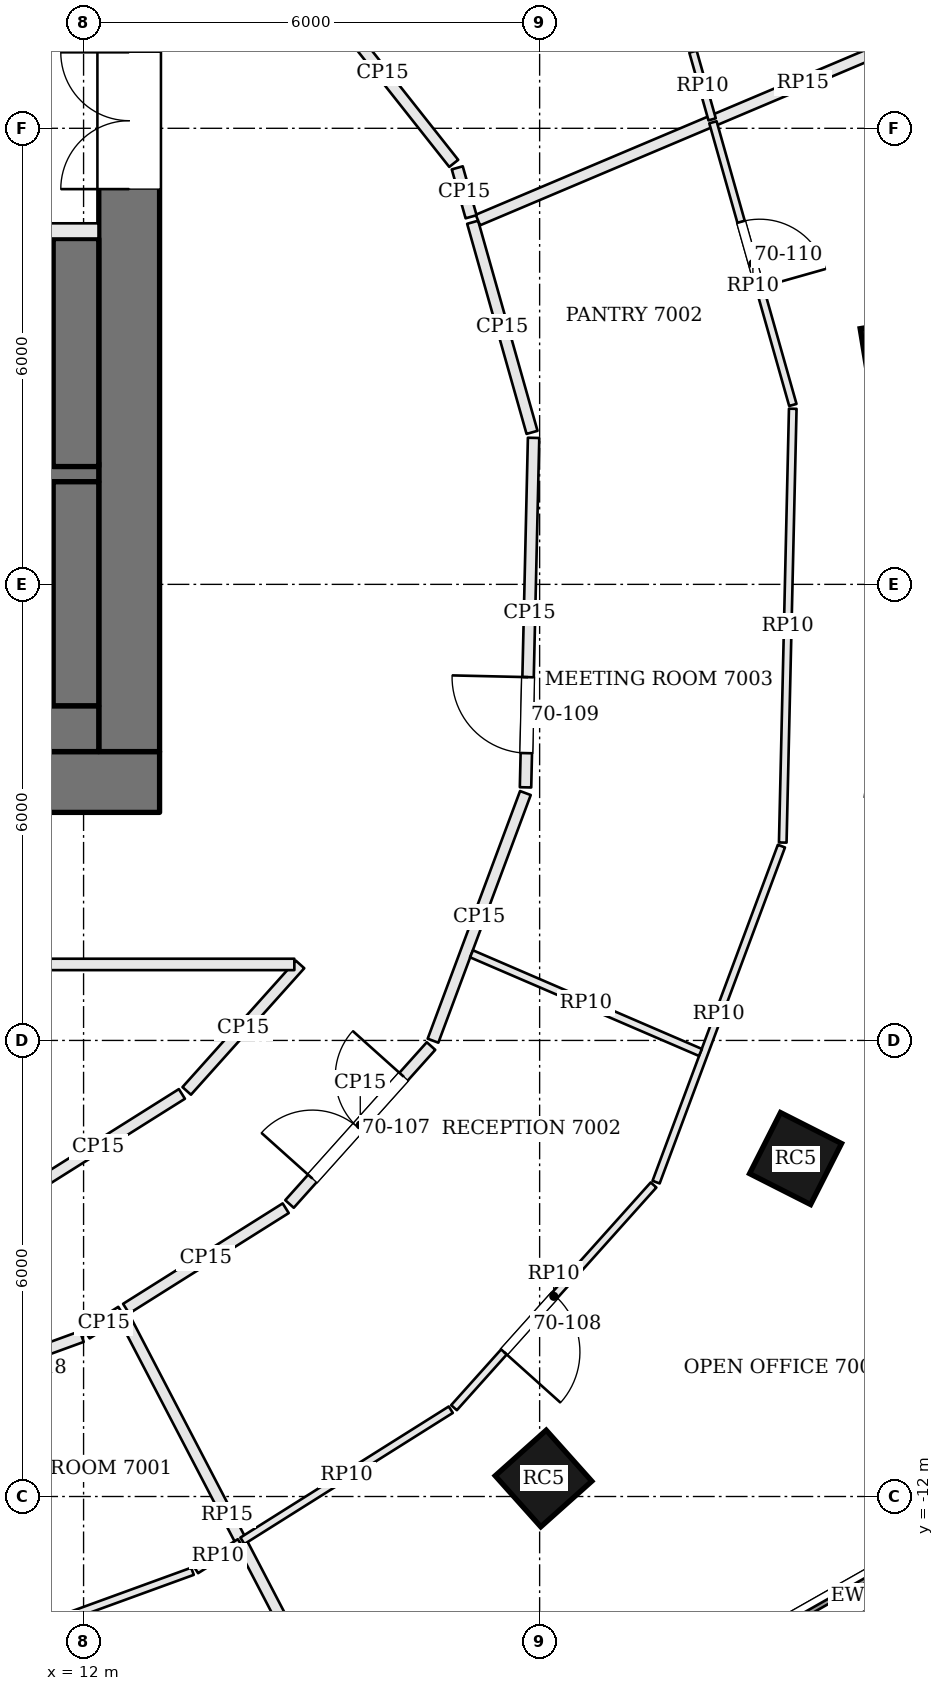
"""IFC4 building model, lengths in metres.
Left out: names, types, materials, properties, quantities, classifications, styles, units other than length and angle.
Written with IfcOpenShell. Run it as: python <this file> out.ifc"""

import sys

from ifc_helpers import new_model, si_unit, direction, frame, frame_2d, origin, origin_2d, place, context, subcontext, project, spatial, rectangle, extrude, element, fill, save


model = new_model("IFC4")
c1 = context("Model", 3, precision=1e-05, world=origin(), true_north=direction((0.0, 1.0)))
c2 = subcontext(c1, "Body", "Model", "MODEL_VIEW")
j1 = project(units=[si_unit("LENGTHUNIT", "METRE"), si_unit("PLANEANGLEUNIT", "RADIAN")], contexts=[c1])
p1 = place(None, origin())
s1 = spatial("IfcSite", under=j1, at=p1, CompositionType="ELEMENT")
p2 = place(p1, origin())
s2 = spatial("IfcBuilding", under=s1, at=p2, CompositionType="ELEMENT")
p3 = place(p2, frame((0.0, 0.0, 284.4)))
s3 = spatial("IfcBuildingStorey", under=s2, at=p3, CompositionType="ELEMENT", Elevation=284.4)
p4 = place(p3, frame((-13.0, -2.6, 0.0), z_axis=(0.0, 0.0, 1.0), x_axis=(1.0, 0.0, 0.0)))
e1 = element("IfcWall", 1, at=p4, inside=s3, PredefinedType="SHEAR", context=c2, shape_type="SweptSolid", body=[
    extrude(rectangle(XDim=26.0, YDim=0.8, at=frame_2d((13.0, 0.0))), origin(), (0.0, 0.0, 1.0), 3.9),
])
p5 = place(p4, frame((9.275, 0.0, 0.0)))
e2 = element("IfcOpeningElement", 2, at=p5, cuts=e1, PredefinedType="OPENING", context=c2, shape_type="SweptSolid", body=[
    extrude(rectangle(XDim=0.9, YDim=2.1, at=frame_2d((0.45, 1.05))), frame((0.0, 0.41, 0.0), z_axis=(0.0, -1.0, 0.0), x_axis=(1.0, 0.0, 0.0)), (0.0, 0.0, 1.0), 0.82),
])
p6 = place(p4, frame((11.75, 0.0, 0.0)))
e3 = element("IfcOpeningElement", 3, at=p6, cuts=e1, PredefinedType="OPENING", context=c2, shape_type="SweptSolid", body=[
    extrude(rectangle(XDim=1.0, YDim=2.1, at=frame_2d((0.5, 1.05))), frame((0.0, 0.41, 0.0), z_axis=(0.0, -1.0, 0.0), x_axis=(1.0, 0.0, 0.0)), (0.0, 0.0, 1.0), 0.82),
])
p7 = place(p4, frame((14.325, 0.0, 0.0)))
e4 = element("IfcOpeningElement", 4, at=p7, cuts=e1, PredefinedType="OPENING", context=c2, shape_type="SweptSolid", body=[
    extrude(rectangle(XDim=0.9, YDim=2.1, at=frame_2d((0.45, 1.05))), frame((0.0, 0.41, 0.0), z_axis=(0.0, -1.0, 0.0), x_axis=(1.0, 0.0, 0.0)), (0.0, 0.0, 1.0), 0.82),
])
p8 = place(p4, frame((16.7, 0.0, 0.0)))
e5 = element("IfcOpeningElement", 5, at=p8, cuts=e1, PredefinedType="OPENING", context=c2, shape_type="SweptSolid", body=[
    extrude(rectangle(XDim=0.9, YDim=2.1, at=frame_2d((0.45, 1.05))), frame((0.0, 0.41, 0.0), z_axis=(0.0, -1.0, 0.0), x_axis=(1.0, 0.0, 0.0)), (0.0, 0.0, 1.0), 0.82),
])
p9 = place(p3, frame((12.6, -2.2, 0.0), z_axis=(0.0, 0.0, 1.0), x_axis=(0.0, 1.0, 0.0)))
e6 = element("IfcWall", 6, at=p9, inside=s3, PredefinedType="SHEAR", context=c2, shape_type="SweptSolid", body=[
    extrude(rectangle(XDim=13.4, YDim=0.8, at=frame_2d((6.7, 0.0))), origin(), (0.0, 0.0, 1.0), 3.9),
])
p10 = place(p9, frame((7.4, 0.0, 0.0)))
e7 = element("IfcOpeningElement", 7, at=p10, cuts=e6, PredefinedType="OPENING", context=c2, shape_type="SweptSolid", body=[
    extrude(rectangle(XDim=1.8, YDim=2.1, at=frame_2d((0.9, 1.05))), frame((0.0, 0.41, 0.0), z_axis=(0.0, -1.0, 0.0), x_axis=(1.0, 0.0, 0.0)), (0.0, 0.0, 1.0), 0.82),
])
for number, where, z_axis, x_axis in (
    (8, (22.734, 2.993, 0.0), (0.0, 0.0, 1.0), (-0.162, 0.987, 0.0)),
    (9, (18.051, -11.763, 0.0), (0.0, 0.0, 1.0), (0.746, 0.666, 0.0)),
    (10, (21.367, -7.554, 0.0), (0.0, 0.0, 1.0), (0.452, 0.892, 0.0)),
):
    element("IfcColumn", number, at=place(p3, frame(where, z_axis=z_axis, x_axis=x_axis)), inside=s3, PredefinedType="COLUMN", context=c2, shape_type="SweptSolid", body=[
        extrude(rectangle(XDim=0.9, YDim=0.9, at=origin_2d()), origin(), (0.0, 0.0, 1.0), 3.9),
    ])
p11 = place(p3, frame((20.115, -14.455, 0.0), z_axis=(0.0, 0.0, 1.0), x_axis=(0.869822679286, 0.493364476427, 0.0)))
e11 = element("IfcWall", 11, at=p11, inside=s3, PredefinedType="SOLIDWALL", context=c2, shape_type="SweptSolid", body=[
    extrude(rectangle(XDim=4.638, YDim=0.45, at=frame_2d((2.319, 0.0))), origin(), (0.0, 0.0, 1.0), 3.7),
])
p12 = place(p11, frame((1.269, 0.0, 0.9)))
e12 = element("IfcOpeningElement", 12, at=p12, cuts=e11, PredefinedType="OPENING", context=c2, shape_type="SweptSolid", body=[
    extrude(rectangle(XDim=2.1, YDim=2.3, at=frame_2d((1.05, 1.15))), frame((0.0, 0.235, 0.0), z_axis=(0.0, -1.0, 0.0), x_axis=(1.0, 0.0, 0.0)), (0.0, 0.0, 1.0), 0.47),
])
p13 = place(p3, frame((12.2, 4.65, 0.0), z_axis=(0.0, 0.0, 1.0), x_axis=(-1.0, 0.0, 0.0)))
e13 = element("IfcWall", 13, at=p13, inside=s3, PredefinedType="SOLIDWALL", context=c2, shape_type="SweptSolid", body=[
    extrude(rectangle(XDim=7.1, YDim=0.2, at=frame_2d((3.55, 0.0))), origin(), (0.0, 0.0, 1.0), 3.7),
])
p14 = place(p13, frame((4.4, 0.0, 0.0)))
e14 = element("IfcOpeningElement", 14, at=p14, cuts=e13, PredefinedType="OPENING", context=c2, shape_type="SweptSolid", body=[
    extrude(rectangle(XDim=1.2, YDim=2.1, at=frame_2d((0.6, 1.05))), frame((0.0, 0.11, 0.0), z_axis=(0.0, -1.0, 0.0), x_axis=(1.0, 0.0, 0.0)), (0.0, 0.0, 1.0), 0.22),
])
p15 = place(p13, frame((1.1, 0.0, 0.0)))
e15 = element("IfcOpeningElement", 15, at=p15, cuts=e13, PredefinedType="OPENING", context=c2, shape_type="SweptSolid", body=[
    extrude(rectangle(XDim=1.2, YDim=2.1, at=frame_2d((0.6, 1.05))), frame((0.0, 0.11, 0.0), z_axis=(0.0, -1.0, 0.0), x_axis=(1.0, 0.0, 0.0)), (0.0, 0.0, 1.0), 0.22),
])
p16 = place(p3, frame((12.2, 1.475, 0.0), z_axis=(0.0, 0.0, 1.0), x_axis=(-1.0, 0.0, 0.0)))
e16 = element("IfcWall", 16, at=p16, inside=s3, PredefinedType="SOLIDWALL", context=c2, shape_type="SweptSolid", body=[
    extrude(rectangle(XDim=7.1, YDim=0.25, at=frame_2d((3.55, 0.0))), origin(), (0.0, 0.0, 1.0), 3.7),
])
p17 = place(p16, frame((5.8, 0.0, 0.0)))
e17 = element("IfcOpeningElement", 17, at=p17, cuts=e16, PredefinedType="OPENING", context=c2, shape_type="SweptSolid", body=[
    extrude(rectangle(XDim=1.2, YDim=2.1, at=frame_2d((0.6, 1.05))), frame((0.0, 0.135, 0.0), z_axis=(0.0, -1.0, 0.0), x_axis=(1.0, 0.0, 0.0)), (0.0, 0.0, 1.0), 0.27),
])
p18 = place(p3, frame((11.9, 4.55, 0.0), z_axis=(0.0, 0.0, 1.0), x_axis=(0.0, -1.0, 0.0)))
e18 = element("IfcWall", 18, at=p18, inside=s3, PredefinedType="SOLIDWALL", context=c2, shape_type="SweptSolid", body=[
    extrude(rectangle(XDim=3.0, YDim=0.6, at=frame_2d((1.5, 0.0))), origin(), (0.0, 0.0, 1.0), 3.7),
])
p19 = place(p3, frame((11.9, 1.35, 0.0), z_axis=(0.0, 0.0, 1.0), x_axis=(0.0, -1.0, 0.0)))
e19 = element("IfcWall", 19, at=p19, inside=s3, PredefinedType="SOLIDWALL", context=c2, shape_type="SweptSolid", body=[
    extrude(rectangle(XDim=2.95, YDim=0.6, at=frame_2d((1.475, 0.0))), origin(), (0.0, 0.0, 1.0), 3.7),
])
p20 = place(p3, frame((12.2, -1.9, 0.0), z_axis=(0.0, 0.0, 1.0), x_axis=(-1.0, 0.0, 0.0)))
e20 = element("IfcWall", 20, at=p20, inside=s3, PredefinedType="SOLIDWALL", context=c2, shape_type="SweptSolid", body=[
    extrude(rectangle(XDim=7.1, YDim=0.6, at=frame_2d((3.55, 0.0))), origin(), (0.0, 0.0, 1.0), 3.7),
])
p21 = place(p3, frame((8.86, -11.03, 0.0), z_axis=(0.0, 0.0, 1.0), x_axis=(0.939685902536, 0.342038601001, 0.0)))
e21 = element("IfcWall", 21, at=p21, inside=s3, PredefinedType="PARTITIONING", context=c2, shape_type="SweptSolid", body=[
    extrude(rectangle(XDim=3.316, YDim=0.15, at=frame_2d((1.658, 0.0))), origin(), (0.0, 0.0, 1.0), 3.198),
])
p22 = place(p21, frame((1.65, 0.0, 0.0)))
e22 = element("IfcOpeningElement", 22, at=p22, cuts=e21, PredefinedType="OPENING", context=c2, shape_type="SweptSolid", body=[
    extrude(rectangle(XDim=0.9, YDim=2.1, at=frame_2d((0.45, 1.05))), frame((0.0, 0.085, 0.0), z_axis=(0.0, -1.0, 0.0), x_axis=(1.0, 0.0, 0.0)), (0.0, 0.0, 1.0), 0.17),
])
p23 = place(p3, frame((12.04, -9.856, 0.0), z_axis=(0.0, 0.0, 1.0), x_axis=(0.846240393033, 0.532801273647, 0.0)))
e23 = element("IfcWall", 23, at=p23, inside=s3, PredefinedType="PARTITIONING", context=c2, shape_type="SweptSolid", body=[
    extrude(rectangle(XDim=0.54, YDim=0.15, at=frame_2d((0.27, 0.0))), origin(), (0.0, 0.0, 1.0), 3.198),
])
p24 = place(p3, frame((15.244, -14.841, 0.0), z_axis=(0.0, 0.0, 1.0), x_axis=(-0.462122511499, 0.886816093881, 0.0)))
e24 = element("IfcWall", 24, at=p24, inside=s3, PredefinedType="PARTITIONING", context=c2, shape_type="SweptSolid", body=[
    extrude(rectangle(XDim=5.871, YDim=0.15, at=frame_2d((2.935, 0.0))), origin(), (0.0, 0.0, 1.0), 3.234),
])
p25 = place(p3, frame((12.56, -9.529, 0.0), z_axis=(0.0, 0.0, 1.0), x_axis=(0.846402081662, 0.53254437952, 0.0)))
e25 = element("IfcWall", 25, at=p25, inside=s3, PredefinedType="PARTITIONING", context=c2, shape_type="SweptSolid", body=[
    extrude(rectangle(XDim=2.481, YDim=0.15, at=frame_2d((1.24, 0.0))), origin(), (0.0, 0.0, 1.0), 3.198),
])
p26 = place(p3, frame((14.709, -8.152, 0.0), z_axis=(0.0, 0.0, 1.0), x_axis=(0.667275630306, 0.744810870758, 0.0)))
e26 = element("IfcWall", 26, at=p26, inside=s3, PredefinedType="PARTITIONING", context=c2, shape_type="SweptSolid", body=[
    extrude(rectangle(XDim=2.79, YDim=0.15, at=frame_2d((1.395, 0.0))), origin(), (0.0, 0.0, 1.0), 3.198),
])
p27 = place(p26, frame((0.45, 0.0, 0.0)))
e27 = element("IfcOpeningElement", 27, at=p27, cuts=e26, PredefinedType="OPENING", context=c2, shape_type="SweptSolid", body=[
    extrude(rectangle(XDim=1.8, YDim=2.1, at=frame_2d((0.9, 1.05))), frame((0.0, 0.085, 0.0), z_axis=(0.0, -1.0, 0.0), x_axis=(1.0, 0.0, 0.0)), (0.0, 0.0, 1.0), 0.17),
])
p28 = place(p3, frame((16.597, -6.003, 0.0), z_axis=(0.0, 0.0, 1.0), x_axis=(0.349499455299, 0.936936567088, 0.0)))
e28 = element("IfcWall", 28, at=p28, inside=s3, PredefinedType="PARTITIONING", context=c2, shape_type="SweptSolid", body=[
    extrude(rectangle(XDim=3.477, YDim=0.15, at=frame_2d((1.739, 0.0))), origin(), (0.0, 0.0, 1.0), 3.198),
])
p29 = place(p3, frame((17.814, -2.67, 0.0), z_axis=(0.0, 0.0, 1.0), x_axis=(0.023038539091, 0.999734577634, 0.0)))
e29 = element("IfcWall", 29, at=p29, inside=s3, PredefinedType="PARTITIONING", context=c2, shape_type="SweptSolid", body=[
    extrude(rectangle(XDim=4.599, YDim=0.15, at=frame_2d((2.3, 0.0))), origin(), (0.0, 0.0, 1.0), 3.198),
])
p30 = place(p29, frame((0.45, 0.0, 0.0)))
e30 = element("IfcOpeningElement", 30, at=p30, cuts=e29, PredefinedType="OPENING", context=c2, shape_type="SweptSolid", body=[
    extrude(rectangle(XDim=1.0, YDim=2.4, at=frame_2d((0.5, 1.2))), frame((0.0, 0.085, 0.0), z_axis=(0.0, -1.0, 0.0), x_axis=(1.0, 0.0, 0.0)), (0.0, 0.0, 1.0), 0.17),
])
p31 = place(p3, frame((17.9, 2.0, 0.0), z_axis=(0.0, 0.0, 1.0), x_axis=(-0.271980959701, 0.962302633042, 0.0)))
e31 = element("IfcWall", 31, at=p31, inside=s3, PredefinedType="PARTITIONING", context=c2, shape_type="SweptSolid", body=[
    extrude(rectangle(XDim=2.873, YDim=0.15, at=frame_2d((1.436, 0.0))), origin(), (0.0, 0.0, 1.0), 3.198),
])
p32 = place(p3, frame((25.739, 8.408, 0.0), z_axis=(0.0, 0.0, 1.0), x_axis=(-0.92106014218, -0.389420357052, 0.0)))
e32 = element("IfcWall", 32, at=p32, inside=s3, PredefinedType="PARTITIONING", context=c2, shape_type="SweptSolid", body=[
    extrude(rectangle(XDim=9.284, YDim=0.15, at=frame_2d((4.642, 0.0))), origin(), (0.0, 0.0, 1.0), 3.234),
])
p33 = place(p3, frame((17.098, 4.836, 0.0), z_axis=(0.0, 0.0, 1.0), x_axis=(-0.271971703561, 0.962305249109, 0.0)))
e33 = element("IfcWall", 33, at=p33, inside=s3, PredefinedType="PARTITIONING", context=c2, shape_type="SweptSolid", body=[
    extrude(rectangle(XDim=0.669, YDim=0.15, at=frame_2d((0.334, 0.0))), origin(), (0.0, 0.0, 1.0), 3.198),
])
p34 = place(p3, frame((16.87, 5.539, 0.0), z_axis=(0.0, 0.0, 1.0), x_axis=(-0.620093074114, 0.784528252796, 0.0)))
e34 = element("IfcWall", 34, at=p34, inside=s3, PredefinedType="PARTITIONING", context=c2, shape_type="SweptSolid", body=[
    extrude(rectangle(XDim=3.015, YDim=0.15, at=frame_2d((1.508, 0.0))), origin(), (0.0, 0.0, 1.0), 3.198),
])
p35 = place(p3, frame((14.848, -5.0, 0.0), z_axis=(0.0, 0.0, 1.0), x_axis=(-0.667363249373, -0.744732363595, 0.0)))
e35 = element("IfcWall", 35, at=p35, inside=s3, PredefinedType="PARTITIONING", context=c2, shape_type="SweptSolid", body=[
    extrude(rectangle(XDim=2.234, YDim=0.15, at=frame_2d((1.117, 0.0))), origin(), (0.0, 0.0, 1.0), 3.198),
])
p36 = place(p3, frame((13.293, -6.704, 0.0), z_axis=(0.0, 0.0, 1.0), x_axis=(-0.84641299998, -0.532527026041, 0.0)))
e36 = element("IfcWall", 36, at=p36, inside=s3, PredefinedType="PARTITIONING", context=c2, shape_type="SweptSolid", body=[
    extrude(rectangle(XDim=2.602, YDim=0.15, at=frame_2d((1.301, 0.0))), origin(), (0.0, 0.0, 1.0), 3.198),
])
p37 = place(p3, frame((-14.789, -5.0, 0.0), z_axis=(0.0, 0.0, 1.0), x_axis=(1.0, 0.0, 0.0)))
e37 = element("IfcWall", 37, at=p37, inside=s3, PredefinedType="PARTITIONING", context=c2, shape_type="SweptSolid", body=[
    extrude(rectangle(XDim=29.562, YDim=0.15, at=frame_2d((14.781, 0.0))), origin(), (0.0, 0.0, 1.0), 3.198),
])
p38 = place(p37, frame((3.857, 0.0, 0.0)))
e38 = element("IfcOpeningElement", 38, at=p38, cuts=e37, PredefinedType="OPENING", context=c2, shape_type="SweptSolid", body=[
    extrude(rectangle(XDim=1.0, YDim=2.4, at=frame_2d((0.5, 1.2))), frame((0.0, 0.085, 0.0), z_axis=(0.0, -1.0, 0.0), x_axis=(1.0, 0.0, 0.0)), (0.0, 0.0, 1.0), 0.17),
])
p39 = place(p37, frame((14.289, 0.0, 0.0)))
e39 = element("IfcOpeningElement", 39, at=p39, cuts=e37, PredefinedType="OPENING", context=c2, shape_type="SweptSolid", body=[
    extrude(rectangle(XDim=1.0, YDim=2.1, at=frame_2d((0.5, 1.05))), frame((0.0, 0.085, 0.0), z_axis=(0.0, -1.0, 0.0), x_axis=(1.0, 0.0, 0.0)), (0.0, 0.0, 1.0), 0.17),
])
p40 = place(p37, frame((24.713, 0.0, 0.0)))
e40 = element("IfcOpeningElement", 40, at=p40, cuts=e37, PredefinedType="OPENING", context=c2, shape_type="SweptSolid", body=[
    extrude(rectangle(XDim=1.0, YDim=2.4, at=frame_2d((0.5, 1.2))), frame((0.0, 0.085, 0.0), z_axis=(0.0, -1.0, 0.0), x_axis=(1.0, 0.0, 0.0)), (0.0, 0.0, 1.0), 0.17),
])
p41 = place(p3, frame((14.056, -12.604, 0.0), z_axis=(0.0, 0.0, 1.0), x_axis=(-0.846544184051, -0.532318461496, 0.0)))
e41 = element("IfcWall", 41, at=p41, inside=s3, PredefinedType="PARTITIONING", context=c2, shape_type="SweptSolid", body=[
    extrude(rectangle(XDim=0.681, YDim=0.1, at=frame_2d((0.34, 0.0))), origin(), (0.0, 0.0, 1.0), 3.198),
])
p42 = place(p3, frame((13.433, -12.984, 0.0), z_axis=(0.0, 0.0, 1.0), x_axis=(-0.939673979614, -0.342071355182, 0.0)))
e42 = element("IfcWall", 42, at=p42, inside=s3, PredefinedType="PARTITIONING", context=c2, shape_type="SweptSolid", body=[
    extrude(rectangle(XDim=4.0, YDim=0.1, at=frame_2d((2.0, 0.0))), origin(), (0.0, 0.0, 1.0), 3.198),
])
p43 = place(p42, frame((2.85, 0.0, 0.0)))
e43 = element("IfcOpeningElement", 43, at=p43, cuts=e42, PredefinedType="OPENING", context=c2, shape_type="SweptSolid", body=[
    extrude(rectangle(XDim=0.9, YDim=2.1, at=frame_2d((0.45, 1.05))), frame((0.0, 0.06, 0.0), z_axis=(0.0, -1.0, 0.0), x_axis=(1.0, 0.0, 0.0)), (0.0, 0.0, 1.0), 0.12),
])
p44 = place(p3, frame((20.28, 6.079, 0.0), z_axis=(0.0, 0.0, 1.0), x_axis=(0.271974810721, -0.962304370942, 0.0)))
e44 = element("IfcWall", 44, at=p44, inside=s3, PredefinedType="PARTITIONING", context=c2, shape_type="SweptSolid", body=[
    extrude(rectangle(XDim=3.865, YDim=0.1, at=frame_2d((1.932, 0.0))), origin(), (0.0, 0.0, 1.0), 3.198),
])
p45 = place(p44, frame((1.36, 0.0, 0.0)))
e45 = element("IfcOpeningElement", 45, at=p45, cuts=e44, PredefinedType="OPENING", context=c2, shape_type="SweptSolid", body=[
    extrude(rectangle(XDim=0.9, YDim=2.1, at=frame_2d((0.45, 1.05))), frame((0.0, 0.06, 0.0), z_axis=(0.0, -1.0, 0.0), x_axis=(1.0, 0.0, 0.0)), (0.0, 0.0, 1.0), 0.12),
])
p46 = place(p3, frame((21.33, 2.31, 0.0), z_axis=(0.0, 0.0, 1.0), x_axis=(-0.023052695677, -0.9997342513, 0.0)))
e46 = element("IfcWall", 46, at=p46, inside=s3, PredefinedType="PARTITIONING", context=c2, shape_type="SweptSolid", body=[
    extrude(rectangle(XDim=5.708, YDim=0.1, at=frame_2d((2.854, 0.0))), origin(), (0.0, 0.0, 1.0), 3.198),
])
p47 = place(p3, frame((21.181, -3.443, 0.0), z_axis=(0.0, 0.0, 1.0), x_axis=(-0.349438657616, -0.936959243811, 0.0)))
e47 = element("IfcWall", 47, at=p47, inside=s3, PredefinedType="PARTITIONING", context=c2, shape_type="SweptSolid", body=[
    extrude(rectangle(XDim=4.718, YDim=0.1, at=frame_2d((2.359, 0.0))), origin(), (0.0, 0.0, 1.0), 3.198),
])
p48 = place(p3, frame((19.499, -7.901, 0.0), z_axis=(0.0, 0.0, 1.0), x_axis=(-0.667320762971, -0.744770433964, 0.0)))
e48 = element("IfcWall", 48, at=p48, inside=s3, PredefinedType="PARTITIONING", context=c2, shape_type="SweptSolid", body=[
    extrude(rectangle(XDim=3.934, YDim=0.1, at=frame_2d((1.967, 0.0))), origin(), (0.0, 0.0, 1.0), 3.198),
])
p49 = place(p48, frame((1.95, 0.0, 0.0)))
e49 = element("IfcOpeningElement", 49, at=p49, cuts=e48, PredefinedType="OPENING", context=c2, shape_type="SweptSolid", body=[
    extrude(rectangle(XDim=1.0, YDim=2.1, at=frame_2d((0.5, 1.05))), frame((0.0, 0.06, 0.0), z_axis=(0.0, -1.0, 0.0), x_axis=(1.0, 0.0, 0.0)), (0.0, 0.0, 1.0), 0.12),
])
p50 = place(p3, frame((16.831, -10.858, 0.0), z_axis=(0.0, 0.0, 1.0), x_axis=(-0.846427876971, -0.532503379413, 0.0)))
e50 = element("IfcWall", 50, at=p50, inside=s3, PredefinedType="PARTITIONING", context=c2, shape_type="SweptSolid", body=[
    extrude(rectangle(XDim=3.239, YDim=0.1, at=frame_2d((1.62, 0.0))), origin(), (0.0, 0.0, 1.0), 3.198),
])
p51 = place(p3, frame((17.104, -4.86, 0.0), z_axis=(0.0, 0.0, 1.0), x_axis=(0.918346015078, -0.395778469084, 0.0)))
e51 = element("IfcWall", 51, at=p51, inside=s3, PredefinedType="PARTITIONING", context=c2, shape_type="SweptSolid", body=[
    extrude(rectangle(XDim=3.279, YDim=0.1, at=frame_2d((1.64, 0.0))), origin(), (0.0, 0.0, 1.0), 3.198),
])
p52 = place(p3, frame((20.018, 7.008, 0.0), z_axis=(0.0, 0.0, 1.0), x_axis=(0.272036681058, -0.962286882462, 0.0)))
e52 = element("IfcWall", 52, at=p52, inside=s3, PredefinedType="PARTITIONING", context=c2, shape_type="SweptSolid", body=[
    extrude(rectangle(XDim=0.925, YDim=0.1, at=frame_2d((0.463, 0.0))), origin(), (0.0, 0.0, 1.0), 3.198),
])
p53 = place(p12, origin())
e53 = element("IfcWindow", 53, at=p53, inside=s3, PartitioningType="SINGLE_PANEL", PredefinedType="WINDOW", context=c2, shape_type="SweptSolid", body=[
    extrude(rectangle(XDim=2.1, YDim=2.3, at=frame_2d((1.05, 1.15))), frame((0.0, 0.135, 0.0), z_axis=(0.0, -1.0, 0.0), x_axis=(1.0, 0.0, 0.0)), (0.0, 0.0, 1.0), 0.06),
])
fill(e12, e53)
p54 = place(p10, origin())
e54 = element("IfcDoor", 54, at=p54, inside=s3, OperationType="DOUBLE_DOOR_SINGLE_SWING", PredefinedType="DOOR", context=c2, shape_type="SweptSolid", body=[
    extrude(rectangle(XDim=1.8, YDim=2.1, at=frame_2d((0.9, 1.05))), frame((0.0, 0.025, 0.0), z_axis=(0.0, -1.0, 0.0), x_axis=(1.0, 0.0, 0.0)), (0.0, 0.0, 1.0), 0.05),
])
fill(e7, e54)
p55 = place(p27, origin())
e55 = element("IfcDoor", 55, at=p55, inside=s3, OperationType="DOUBLE_DOOR_SINGLE_SWING", PredefinedType="DOOR", context=c2, shape_type="SweptSolid", body=[
    extrude(rectangle(XDim=1.8, YDim=2.1, at=frame_2d((0.9, 1.05))), frame((0.0, 0.025, 0.0), z_axis=(0.0, -1.0, 0.0), x_axis=(1.0, 0.0, 0.0)), (0.0, 0.0, 1.0), 0.05),
])
fill(e27, e55)
p56 = place(p49, origin())
e56 = element("IfcDoor", 56, at=p56, inside=s3, OperationType="SINGLE_SWING_RIGHT", PredefinedType="DOOR", context=c2, shape_type="SweptSolid", body=[
    extrude(rectangle(XDim=1.0, YDim=2.1, at=frame_2d((0.5, 1.05))), frame((0.0, 0.025, 0.0), z_axis=(0.0, -1.0, 0.0), x_axis=(1.0, 0.0, 0.0)), (0.0, 0.0, 1.0), 0.05),
])
fill(e49, e56)
p57 = place(p30, origin())
e57 = element("IfcDoor", 57, at=p57, inside=s3, OperationType="SINGLE_SWING_RIGHT", PredefinedType="DOOR", context=c2, shape_type="SweptSolid", body=[
    extrude(rectangle(XDim=1.0, YDim=2.4, at=frame_2d((0.5, 1.2))), frame((0.0, 0.025, 0.0), z_axis=(0.0, -1.0, 0.0), x_axis=(1.0, 0.0, 0.0)), (0.0, 0.0, 1.0), 0.05),
])
fill(e30, e57)
p58 = place(p45, origin())
e58 = element("IfcDoor", 58, at=p58, inside=s3, OperationType="SINGLE_SWING_RIGHT", PredefinedType="DOOR", context=c2, shape_type="SweptSolid", body=[
    extrude(rectangle(XDim=0.9, YDim=2.1, at=frame_2d((0.45, 1.05))), frame((0.0, 0.025, 0.0), z_axis=(0.0, -1.0, 0.0), x_axis=(1.0, 0.0, 0.0)), (0.0, 0.0, 1.0), 0.05),
])
fill(e45, e58)
save(model, sys.argv[1])
